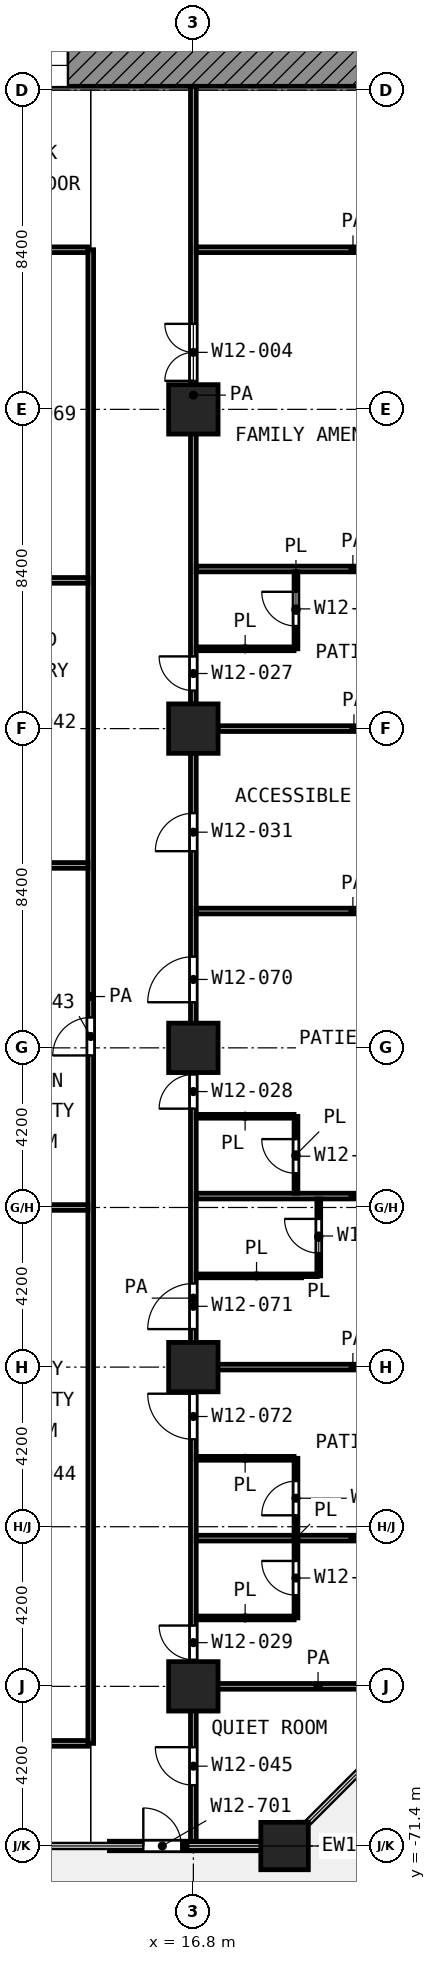
"""IFC4 building model, lengths in metres.
Left out: names, types, materials, properties, quantities, classifications, styles, units other than length and angle.
Written with IfcOpenShell. Run it as: python <this file> out.ifc"""

import sys

from ifc_helpers import new_model, si_unit, direction, frame, frame_2d, origin, origin_2d, place, context, subcontext, project, spatial, rectangle, extrude, element, fill, save


model = new_model("IFC4")
c1 = context("Model", 3, precision=1e-05, world=origin(), true_north=direction((0.0, 1.0)))
c2 = subcontext(c1, "Body", "Model", "MODEL_VIEW")
j1 = project(units=[si_unit("LENGTHUNIT", "METRE"), si_unit("PLANEANGLEUNIT", "RADIAN")], contexts=[c1])
p1 = place(None, origin())
s1 = spatial("IfcSite", under=j1, at=p1, CompositionType="ELEMENT")
p2 = place(p1, origin())
s2 = spatial("IfcBuilding", under=s1, at=p2, CompositionType="ELEMENT")
p3 = place(p2, frame((0.0, 0.0, 77.0)))
s3 = spatial("IfcBuildingStorey", under=s2, at=p3, CompositionType="ELEMENT", Elevation=77.0)
for number, where, z_axis, x_axis in (
    (1, (16.8, -33.6, 0.0), (0.0, 0.0, 1.0), (1.0, 0.0, 0.0)),
    (2, (16.8, -42.0, 0.0), (0.0, 0.0, 1.0), (1.0, 0.0, 0.0)),
    (3, (16.8, -50.4, 0.0), (0.0, 0.0, 1.0), (1.0, 0.0, 0.0)),
    (4, (16.8, -58.8, 0.0), (0.0, 0.0, 1.0), (1.0, 0.0, 0.0)),
    (5, (16.8, -67.2, 0.0), (0.0, 0.0, 1.0), (1.0, 0.0, 0.0)),
):
    element("IfcColumn", number, at=place(p3, frame(where, z_axis=z_axis, x_axis=x_axis)), inside=s3, PredefinedType="COLUMN", context=c2, shape_type="SweptSolid", body=[
        extrude(rectangle(XDim=1.3, YDim=1.3, at=origin_2d()), origin(), (0.0, 0.0, 1.0), 4.2),
    ])
p4 = place(p3, frame((19.2, -71.4, 0.0), z_axis=(0.0, 0.0, 1.0), x_axis=(1.0, 0.0, 0.0)))
e6 = element("IfcColumn", 6, at=p4, inside=s3, PredefinedType="COLUMN", context=c2, shape_type="SweptSolid", body=[
    extrude(rectangle(XDim=1.25, YDim=1.25, at=origin_2d()), origin(), (0.0, 0.0, 1.0), 4.2),
])
p5 = place(p3, frame((14.592, -71.4, 0.0), z_axis=(0.0, 0.0, 1.0), x_axis=(1.0, 0.0, 0.0)))
e7 = element("IfcWall", 7, at=p5, inside=s3, PredefinedType="SOLIDWALL", context=c2, shape_type="SweptSolid", body=[
    extrude(rectangle(XDim=3.983, YDim=0.25, at=frame_2d((1.992, 0.0))), origin(), (0.0, 0.0, 1.0), 3.78),
])
p6 = place(p5, frame((0.892, 0.0, 0.0)))
e8 = element("IfcOpeningElement", 8, at=p6, cuts=e7, PredefinedType="OPENING", context=c2, shape_type="SweptSolid", body=[
    extrude(rectangle(XDim=1.0, YDim=2.1, at=frame_2d((0.5, 1.05))), frame((0.0, 0.135, 0.0), z_axis=(0.0, -1.0, 0.0), x_axis=(1.0, 0.0, 0.0)), (0.0, 0.0, 1.0), 0.27),
])
p7 = place(p3, frame((5.4, -24.55, 0.0), z_axis=(0.0, 0.0, 1.0), x_axis=(1.0, 0.0, 0.0)))
e9 = element("IfcWall", 9, at=p7, inside=s3, PredefinedType="SHEAR", context=c2, shape_type="SweptSolid", body=[
    extrude(rectangle(XDim=18.6, YDim=1.1, at=frame_2d((9.3, 0.0))), origin(), (0.0, 0.0, 1.0), 3.9),
])
p8 = place(p7, frame((6.3, 0.0, 0.0)))
e10 = element("IfcOpeningElement", 10, at=p8, cuts=e9, PredefinedType="OPENING", context=c2, shape_type="SweptSolid", body=[
    extrude(rectangle(XDim=1.8, YDim=2.1, at=frame_2d((0.9, 1.05))), frame((0.0, 0.56, 0.0), z_axis=(0.0, -1.0, 0.0), x_axis=(1.0, 0.0, 0.0)), (0.0, 0.0, 1.0), 1.12),
])
for number, where, z_axis, x_axis in (
    (11, (16.875, -65.4, 0.0), (0.0, 0.0, 1.0), (1.0, 0.0, 0.0)),
    (12, (16.875, -61.2, 0.0), (0.0, 0.0, 1.0), (1.0, 0.0, 0.0)),
):
    element("IfcWall", number, at=place(p3, frame(where, z_axis=z_axis, x_axis=x_axis)), inside=s3, PredefinedType="PARTITIONING", context=c2, shape_type="SweptSolid", body=[
        extrude(rectangle(XDim=2.575, YDim=0.1, at=frame_2d((1.288, 0.0))), origin(), (0.0, 0.0, 1.0), 3.9),
    ])
p9 = place(p3, frame((16.875, -56.4, 0.0), z_axis=(0.0, 0.0, 1.0), x_axis=(1.0, 0.0, 0.0)))
e13 = element("IfcWall", 13, at=p9, inside=s3, PredefinedType="PARTITIONING", context=c2, shape_type="SweptSolid", body=[
    extrude(rectangle(XDim=3.175, YDim=0.1, at=frame_2d((1.587, 0.0))), origin(), (0.0, 0.0, 1.0), 3.9),
])
p10 = place(p3, frame((16.875, -52.2, 0.0), z_axis=(0.0, 0.0, 1.0), x_axis=(1.0, 0.0, 0.0)))
e14 = element("IfcWall", 14, at=p10, inside=s3, PredefinedType="PARTITIONING", context=c2, shape_type="SweptSolid", body=[
    extrude(rectangle(XDim=2.574, YDim=0.1, at=frame_2d((1.287, 0.0))), origin(), (0.0, 0.0, 1.0), 3.9),
])
p11 = place(p3, frame((16.875, -39.9, 0.0), z_axis=(0.0, 0.0, 1.0), x_axis=(1.0, 0.0, 0.0)))
e15 = element("IfcWall", 15, at=p11, inside=s3, PredefinedType="PARTITIONING", context=c2, shape_type="SweptSolid", body=[
    extrude(rectangle(XDim=2.575, YDim=0.1, at=frame_2d((1.288, 0.0))), origin(), (0.0, 0.0, 1.0), 3.9),
])
p12 = place(p3, frame((19.5, -65.4, 0.0), z_axis=(0.0, 0.0, 1.0), x_axis=(0.0, 1.0, 0.0)))
e16 = element("IfcWall", 16, at=p12, inside=s3, PredefinedType="PARTITIONING", context=c2, shape_type="SweptSolid", body=[
    extrude(rectangle(XDim=4.2, YDim=0.1, at=frame_2d((2.1, 0.0))), origin(), (0.0, 0.0, 1.0), 3.9),
])
p13 = place(p12, frame((2.7, 0.0, 0.0)))
e17 = element("IfcOpeningElement", 17, at=p13, cuts=e16, PredefinedType="OPENING", context=c2, shape_type="SweptSolid", body=[
    extrude(rectangle(XDim=0.9, YDim=2.1, at=frame_2d((0.45, 1.05))), frame((0.0, 0.06, 0.0), z_axis=(0.0, -1.0, 0.0), x_axis=(1.0, 0.0, 0.0)), (0.0, 0.0, 1.0), 0.12),
])
p14 = place(p12, frame((0.6, 0.0, 0.0)))
e18 = element("IfcOpeningElement", 18, at=p14, cuts=e16, PredefinedType="OPENING", context=c2, shape_type="SweptSolid", body=[
    extrude(rectangle(XDim=0.9, YDim=2.1, at=frame_2d((0.45, 1.05))), frame((0.0, 0.06, 0.0), z_axis=(0.0, -1.0, 0.0), x_axis=(1.0, 0.0, 0.0)), (0.0, 0.0, 1.0), 0.12),
])
p15 = place(p3, frame((19.5, -54.225, 0.0), z_axis=(0.0, 0.0, 1.0), x_axis=(0.0, 1.0, 0.0)))
e19 = element("IfcWall", 19, at=p15, inside=s3, PredefinedType="PARTITIONING", context=c2, shape_type="SweptSolid", body=[
    extrude(rectangle(XDim=2.023, YDim=0.1, at=frame_2d((1.012, 0.0))), origin(), (0.0, 0.0, 1.0), 3.9),
])
p16 = place(p15, frame((0.524, 0.0, 0.0)))
e20 = element("IfcOpeningElement", 20, at=p16, cuts=e19, PredefinedType="OPENING", context=c2, shape_type="SweptSolid", body=[
    extrude(rectangle(XDim=0.9, YDim=2.1, at=frame_2d((0.45, 1.05))), frame((0.0, 0.06, 0.0), z_axis=(0.0, -1.0, 0.0), x_axis=(1.0, 0.0, 0.0)), (0.0, 0.0, 1.0), 0.12),
])
p17 = place(p3, frame((19.5, -39.9, 0.0), z_axis=(0.0, 0.0, 1.0), x_axis=(0.0, 1.0, 0.0)))
e21 = element("IfcWall", 21, at=p17, inside=s3, PredefinedType="PARTITIONING", context=c2, shape_type="SweptSolid", body=[
    extrude(rectangle(XDim=2.025, YDim=0.1, at=frame_2d((1.012, 0.0))), origin(), (0.0, 0.0, 1.0), 3.9),
])
p18 = place(p17, frame((0.6, 0.0, 0.0)))
e22 = element("IfcOpeningElement", 22, at=p18, cuts=e21, PredefinedType="OPENING", context=c2, shape_type="SweptSolid", body=[
    extrude(rectangle(XDim=0.9, YDim=2.1, at=frame_2d((0.45, 1.05))), frame((0.0, 0.06, 0.0), z_axis=(0.0, -1.0, 0.0), x_axis=(1.0, 0.0, 0.0)), (0.0, 0.0, 1.0), 0.12),
])
p19 = place(p3, frame((20.1, -56.4, 0.0), z_axis=(0.0, 0.0, 1.0), x_axis=(0.0, 1.0, 0.0)))
e23 = element("IfcWall", 23, at=p19, inside=s3, PredefinedType="PARTITIONING", context=c2, shape_type="SweptSolid", body=[
    extrude(rectangle(XDim=2.025, YDim=0.1, at=frame_2d((1.012, 0.0))), origin(), (0.0, 0.0, 1.0), 3.9),
])
p20 = place(p19, frame((0.6, 0.0, 0.0)))
e24 = element("IfcOpeningElement", 24, at=p20, cuts=e23, PredefinedType="OPENING", context=c2, shape_type="SweptSolid", body=[
    extrude(rectangle(XDim=0.9, YDim=2.1, at=frame_2d((0.45, 1.05))), frame((0.0, 0.06, 0.0), z_axis=(0.0, -1.0, 0.0), x_axis=(1.0, 0.0, 0.0)), (0.0, 0.0, 1.0), 0.12),
])
p21 = place(p3, frame((11.175, -68.7, 0.0), z_axis=(0.0, 0.0, 1.0), x_axis=(1.0, 0.0, 0.0)))
e25 = element("IfcWall", 25, at=p21, inside=s3, PredefinedType="PARTITIONING", context=c2, shape_type="SweptSolid", body=[
    extrude(rectangle(XDim=2.85, YDim=0.15, at=frame_2d((1.425, 0.0))), origin(), (0.0, 0.0, 1.0), 3.9),
])
p22 = place(p3, frame((16.875, -67.2, 0.0), z_axis=(0.0, 0.0, 1.0), x_axis=(1.0, 0.0, 0.0)))
e26 = element("IfcWall", 26, at=p22, inside=s3, PredefinedType="PARTITIONING", context=c2, shape_type="SweptSolid", body=[
    extrude(rectangle(XDim=6.412, YDim=0.15, at=frame_2d((3.206, 0.0))), origin(), (0.0, 0.0, 1.0), 3.9),
])
for number, where, z_axis, x_axis in (
    (27, (16.875, -63.3, 0.0), (0.0, 0.0, 1.0), (1.0, 0.0, 0.0)),
    (28, (16.875, -58.8, 0.0), (0.0, 0.0, 1.0), (1.0, 0.0, 0.0)),
):
    element("IfcWall", number, at=place(p3, frame(where, z_axis=z_axis, x_axis=x_axis)), inside=s3, PredefinedType="PARTITIONING", context=c2, shape_type="SweptSolid", body=[
        extrude(rectangle(XDim=8.245, YDim=0.15, at=frame_2d((4.123, 0.0))), origin(), (0.0, 0.0, 1.0), 3.9),
    ])
p23 = place(p3, frame((11.175, -54.6, 0.0), z_axis=(0.0, 0.0, 1.0), x_axis=(1.0, 0.0, 0.0)))
e29 = element("IfcWall", 29, at=p23, inside=s3, PredefinedType="PARTITIONING", context=c2, shape_type="SweptSolid", body=[
    extrude(rectangle(XDim=2.85, YDim=0.15, at=frame_2d((1.425, 0.0))), origin(), (0.0, 0.0, 1.0), 3.9),
])
for number, where, z_axis, x_axis in (
    (30, (16.875, -54.3, 0.0), (0.0, 0.0, 1.0), (1.0, 0.0, 0.0)),
    (31, (16.875, -46.8, 0.0), (0.0, 0.0, 1.0), (1.0, 0.0, 0.0)),
):
    element("IfcWall", number, at=place(p3, frame(where, z_axis=z_axis, x_axis=x_axis)), inside=s3, PredefinedType="PARTITIONING", context=c2, shape_type="SweptSolid", body=[
        extrude(rectangle(XDim=8.245, YDim=0.15, at=frame_2d((4.123, 0.0))), origin(), (0.0, 0.0, 1.0), 3.9),
    ])
p24 = place(p3, frame((11.175, -45.6, 0.0), z_axis=(0.0, 0.0, 1.0), x_axis=(1.0, 0.0, 0.0)))
e32 = element("IfcWall", 32, at=p24, inside=s3, PredefinedType="PARTITIONING", context=c2, shape_type="SweptSolid", body=[
    extrude(rectangle(XDim=2.85, YDim=0.15, at=frame_2d((1.425, 0.0))), origin(), (0.0, 0.0, 1.0), 3.9),
])
p25 = place(p3, frame((17.45, -42.0, 0.0), z_axis=(0.0, 0.0, 1.0), x_axis=(1.0, 0.0, 0.0)))
e33 = element("IfcWall", 33, at=p25, inside=s3, PredefinedType="PARTITIONING", context=c2, shape_type="SweptSolid", body=[
    extrude(rectangle(XDim=7.15, YDim=0.15, at=frame_2d((3.575, 0.0))), origin(), (0.0, 0.0, 1.0), 3.9),
])
p26 = place(p3, frame((11.175, -38.1, 0.0), z_axis=(0.0, 0.0, 1.0), x_axis=(1.0, 0.0, 0.0)))
e34 = element("IfcWall", 34, at=p26, inside=s3, PredefinedType="PARTITIONING", context=c2, shape_type="SweptSolid", body=[
    extrude(rectangle(XDim=2.85, YDim=0.15, at=frame_2d((1.425, 0.0))), origin(), (0.0, 0.0, 1.0), 3.9),
])
p27 = place(p3, frame((16.875, -37.8, 0.0), z_axis=(0.0, 0.0, 1.0), x_axis=(1.0, 0.0, 0.0)))
e35 = element("IfcWall", 35, at=p27, inside=s3, PredefinedType="PARTITIONING", context=c2, shape_type="SweptSolid", body=[
    extrude(rectangle(XDim=8.245, YDim=0.15, at=frame_2d((4.123, 0.0))), origin(), (0.0, 0.0, 1.0), 3.9),
])
p28 = place(p3, frame((11.175, -29.4, 0.0), z_axis=(0.0, 0.0, 1.0), x_axis=(1.0, 0.0, 0.0)))
e36 = element("IfcWall", 36, at=p28, inside=s3, PredefinedType="PARTITIONING", context=c2, shape_type="SweptSolid", body=[
    extrude(rectangle(XDim=2.85, YDim=0.15, at=frame_2d((1.425, 0.0))), origin(), (0.0, 0.0, 1.0), 3.9),
])
p29 = place(p3, frame((16.875, -29.4, 0.0), z_axis=(0.0, 0.0, 1.0), x_axis=(1.0, 0.0, 0.0)))
e37 = element("IfcWall", 37, at=p29, inside=s3, PredefinedType="PARTITIONING", context=c2, shape_type="SweptSolid", body=[
    extrude(rectangle(XDim=8.25, YDim=0.15, at=frame_2d((4.125, 0.0))), origin(), (0.0, 0.0, 1.0), 3.9),
])
p30 = place(p3, frame((14.1, -68.7, 0.0), z_axis=(0.0, 0.0, 1.0), x_axis=(0.0, 1.0, 0.0)))
e38 = element("IfcWall", 38, at=p30, inside=s3, PredefinedType="PARTITIONING", context=c2, shape_type="SweptSolid", body=[
    extrude(rectangle(XDim=39.3, YDim=0.15, at=frame_2d((19.65, 0.0))), origin(), (0.0, 0.0, 1.0), 3.9),
])
p31 = place(p30, frame((18.1, 0.0, 0.0)))
e39 = element("IfcOpeningElement", 39, at=p31, cuts=e38, PredefinedType="OPENING", context=c2, shape_type="SweptSolid", body=[
    extrude(rectangle(XDim=1.0, YDim=2.1, at=frame_2d((0.5, 1.05))), frame((0.0, 0.085, 0.0), z_axis=(0.0, -1.0, 0.0), x_axis=(1.0, 0.0, 0.0)), (0.0, 0.0, 1.0), 0.17),
])
p32 = place(p3, frame((16.8, -71.32, 0.0), z_axis=(0.0, 0.0, 1.0), x_axis=(0.0, 1.0, 0.0)))
e40 = element("IfcWall", 40, at=p32, inside=s3, PredefinedType="PARTITIONING", context=c2, shape_type="SweptSolid", body=[
    extrude(rectangle(XDim=28.67, YDim=0.15, at=frame_2d((14.335, 0.0))), origin(), (0.0, 0.0, 1.0), 3.9),
])
p33 = place(p32, frame((26.095, 0.0, 0.0)))
e41 = element("IfcOpeningElement", 41, at=p33, cuts=e40, PredefinedType="OPENING", context=c2, shape_type="SweptSolid", body=[
    extrude(rectangle(XDim=1.0, YDim=2.1, at=frame_2d((0.5, 1.05))), frame((0.0, 0.085, 0.0), z_axis=(0.0, -1.0, 0.0), x_axis=(1.0, 0.0, 0.0)), (0.0, 0.0, 1.0), 0.17),
])
p34 = place(p32, frame((22.12, 0.0, 0.0)))
e42 = element("IfcOpeningElement", 42, at=p34, cuts=e40, PredefinedType="OPENING", context=c2, shape_type="SweptSolid", body=[
    extrude(rectangle(XDim=1.2, YDim=2.1, at=frame_2d((0.6, 1.05))), frame((0.0, 0.085, 0.0), z_axis=(0.0, -1.0, 0.0), x_axis=(1.0, 0.0, 0.0)), (0.0, 0.0, 1.0), 0.17),
])
p35 = place(p32, frame((19.32, 0.0, 0.0)))
e43 = element("IfcOpeningElement", 43, at=p35, cuts=e40, PredefinedType="OPENING", context=c2, shape_type="SweptSolid", body=[
    extrude(rectangle(XDim=0.9, YDim=2.1, at=frame_2d((0.45, 1.05))), frame((0.0, 0.085, 0.0), z_axis=(0.0, -1.0, 0.0), x_axis=(1.0, 0.0, 0.0)), (0.0, 0.0, 1.0), 0.17),
])
p36 = place(p32, frame((13.52, 0.0, 0.0)))
e44 = element("IfcOpeningElement", 44, at=p36, cuts=e40, PredefinedType="OPENING", context=c2, shape_type="SweptSolid", body=[
    extrude(rectangle(XDim=1.2, YDim=2.1, at=frame_2d((0.6, 1.05))), frame((0.0, 0.085, 0.0), z_axis=(0.0, -1.0, 0.0), x_axis=(1.0, 0.0, 0.0)), (0.0, 0.0, 1.0), 0.17),
])
p37 = place(p32, frame((10.62, 0.0, 0.0)))
e45 = element("IfcOpeningElement", 45, at=p37, cuts=e40, PredefinedType="OPENING", context=c2, shape_type="SweptSolid", body=[
    extrude(rectangle(XDim=1.2, YDim=2.1, at=frame_2d((0.6, 1.05))), frame((0.0, 0.085, 0.0), z_axis=(0.0, -1.0, 0.0), x_axis=(1.0, 0.0, 0.0)), (0.0, 0.0, 1.0), 0.17),
])
p38 = place(p32, frame((4.82, 0.0, 0.0)))
e46 = element("IfcOpeningElement", 46, at=p38, cuts=e40, PredefinedType="OPENING", context=c2, shape_type="SweptSolid", body=[
    extrude(rectangle(XDim=0.9, YDim=2.1, at=frame_2d((0.45, 1.05))), frame((0.0, 0.085, 0.0), z_axis=(0.0, -1.0, 0.0), x_axis=(1.0, 0.0, 0.0)), (0.0, 0.0, 1.0), 0.17),
])
p39 = place(p32, frame((1.52, 0.0, 0.0)))
e47 = element("IfcOpeningElement", 47, at=p39, cuts=e40, PredefinedType="OPENING", context=c2, shape_type="SweptSolid", body=[
    extrude(rectangle(XDim=1.0, YDim=2.1, at=frame_2d((0.5, 1.05))), frame((0.0, 0.085, 0.0), z_axis=(0.0, -1.0, 0.0), x_axis=(1.0, 0.0, 0.0)), (0.0, 0.0, 1.0), 0.17),
])
p40 = place(p3, frame((16.8, -41.35, 0.0), z_axis=(0.0, 0.0, 1.0), x_axis=(0.0, 1.0, 0.0)))
e48 = element("IfcWall", 48, at=p40, inside=s3, PredefinedType="PARTITIONING", context=c2, shape_type="SweptSolid", body=[
    extrude(rectangle(XDim=16.25, YDim=0.15, at=frame_2d((8.125, 0.0))), origin(), (0.0, 0.0, 1.0), 3.9),
])
p41 = place(p40, frame((8.5, 0.0, 0.0)))
e49 = element("IfcOpeningElement", 49, at=p41, cuts=e48, PredefinedType="OPENING", context=c2, shape_type="SweptSolid", body=[
    extrude(rectangle(XDim=1.5, YDim=2.1, at=frame_2d((0.75, 1.05))), frame((0.0, 0.085, 0.0), z_axis=(0.0, -1.0, 0.0), x_axis=(1.0, 0.0, 0.0)), (0.0, 0.0, 1.0), 0.17),
])
p42 = place(p40, frame((0.35, 0.0, 0.0)))
e50 = element("IfcOpeningElement", 50, at=p42, cuts=e48, PredefinedType="OPENING", context=c2, shape_type="SweptSolid", body=[
    extrude(rectangle(XDim=0.9, YDim=2.1, at=frame_2d((0.45, 1.05))), frame((0.0, 0.085, 0.0), z_axis=(0.0, -1.0, 0.0), x_axis=(1.0, 0.0, 0.0)), (0.0, 0.0, 1.0), 0.17),
])
p43 = place(p6, origin())
e51 = element("IfcDoor", 51, at=p43, inside=s3, OperationType="SINGLE_SWING_LEFT", PredefinedType="DOOR", context=c2, shape_type="SweptSolid", body=[
    extrude(rectangle(XDim=1.0, YDim=2.1, at=frame_2d((0.5, 1.05))), frame((0.0, 0.025, 0.0), z_axis=(0.0, -1.0, 0.0), x_axis=(1.0, 0.0, 0.0)), (0.0, 0.0, 1.0), 0.05),
])
fill(e8, e51)
p44 = place(p8, origin())
e52 = element("IfcDoor", 52, at=p44, inside=s3, OperationType="DOUBLE_DOOR_SINGLE_SWING", PredefinedType="DOOR", context=c2, shape_type="SweptSolid", body=[
    extrude(rectangle(XDim=1.8, YDim=2.1, at=frame_2d((0.9, 1.05))), frame((0.0, 0.025, 0.0), z_axis=(0.0, -1.0, 0.0), x_axis=(1.0, 0.0, 0.0)), (0.0, 0.0, 1.0), 0.05),
])
fill(e10, e52)
p45 = place(p31, origin())
e53 = element("IfcDoor", 53, at=p45, inside=s3, OperationType="SINGLE_SWING_LEFT", PredefinedType="DOOR", context=c2, shape_type="SweptSolid", body=[
    extrude(rectangle(XDim=1.0, YDim=2.1, at=frame_2d((0.5, 1.05))), frame((0.0, 0.025, 0.0), z_axis=(0.0, -1.0, 0.0), x_axis=(1.0, 0.0, 0.0)), (0.0, 0.0, 1.0), 0.05),
])
fill(e39, e53)
p46 = place(p41, origin())
e54 = element("IfcDoor", 54, at=p46, inside=s3, OperationType="DOUBLE_DOOR_SINGLE_SWING", PredefinedType="DOOR", context=c2, shape_type="SweptSolid", body=[
    extrude(rectangle(XDim=1.5, YDim=2.1, at=frame_2d((0.75, 1.05))), frame((0.0, 0.025, 0.0), z_axis=(0.0, -1.0, 0.0), x_axis=(1.0, 0.0, 0.0)), (0.0, 0.0, 1.0), 0.05),
])
fill(e49, e54)
p47 = place(p42, origin())
e55 = element("IfcDoor", 55, at=p47, inside=s3, OperationType="SINGLE_SWING_RIGHT", PredefinedType="DOOR", context=c2, shape_type="SweptSolid", body=[
    extrude(rectangle(XDim=0.9, YDim=2.1, at=frame_2d((0.45, 1.05))), frame((0.0, 0.025, 0.0), z_axis=(0.0, -1.0, 0.0), x_axis=(1.0, 0.0, 0.0)), (0.0, 0.0, 1.0), 0.05),
])
fill(e50, e55)
p48 = place(p18, origin())
e56 = element("IfcDoor", 56, at=p48, inside=s3, OperationType="SINGLE_SWING_RIGHT", PredefinedType="DOOR", context=c2, shape_type="SweptSolid", body=[
    extrude(rectangle(XDim=0.9, YDim=2.1, at=frame_2d((0.45, 1.05))), frame((0.0, 0.025, 0.0), z_axis=(0.0, -1.0, 0.0), x_axis=(1.0, 0.0, 0.0)), (0.0, 0.0, 1.0), 0.05),
])
fill(e22, e56)
p49 = place(p33, origin())
e57 = element("IfcDoor", 57, at=p49, inside=s3, OperationType="SINGLE_SWING_LEFT", PredefinedType="DOOR", context=c2, shape_type="SweptSolid", body=[
    extrude(rectangle(XDim=1.0, YDim=2.1, at=frame_2d((0.5, 1.05))), frame((0.0, 0.025, 0.0), z_axis=(0.0, -1.0, 0.0), x_axis=(1.0, 0.0, 0.0)), (0.0, 0.0, 1.0), 0.05),
])
fill(e41, e57)
p50 = place(p34, origin())
e58 = element("IfcDoor", 58, at=p50, inside=s3, OperationType="SINGLE_SWING_LEFT", PredefinedType="DOOR", context=c2, shape_type="SweptSolid", body=[
    extrude(rectangle(XDim=1.2, YDim=2.1, at=frame_2d((0.6, 1.05))), frame((0.0, 0.025, 0.0), z_axis=(0.0, -1.0, 0.0), x_axis=(1.0, 0.0, 0.0)), (0.0, 0.0, 1.0), 0.05),
])
fill(e42, e58)
p51 = place(p35, origin())
e59 = element("IfcDoor", 59, at=p51, inside=s3, OperationType="SINGLE_SWING_LEFT", PredefinedType="DOOR", context=c2, shape_type="SweptSolid", body=[
    extrude(rectangle(XDim=0.9, YDim=2.1, at=frame_2d((0.45, 1.05))), frame((0.0, 0.025, 0.0), z_axis=(0.0, -1.0, 0.0), x_axis=(1.0, 0.0, 0.0)), (0.0, 0.0, 1.0), 0.05),
])
fill(e43, e59)
p52 = place(p16, origin())
e60 = element("IfcDoor", 60, at=p52, inside=s3, OperationType="SINGLE_SWING_RIGHT", PredefinedType="DOOR", context=c2, shape_type="SweptSolid", body=[
    extrude(rectangle(XDim=0.9, YDim=2.1, at=frame_2d((0.45, 1.05))), frame((0.0, 0.025, 0.0), z_axis=(0.0, -1.0, 0.0), x_axis=(1.0, 0.0, 0.0)), (0.0, 0.0, 1.0), 0.05),
])
fill(e20, e60)
p53 = place(p36, origin())
e61 = element("IfcDoor", 61, at=p53, inside=s3, OperationType="SINGLE_SWING_LEFT", PredefinedType="DOOR", context=c2, shape_type="SweptSolid", body=[
    extrude(rectangle(XDim=1.2, YDim=2.1, at=frame_2d((0.6, 1.05))), frame((0.0, 0.025, 0.0), z_axis=(0.0, -1.0, 0.0), x_axis=(1.0, 0.0, 0.0)), (0.0, 0.0, 1.0), 0.05),
])
fill(e44, e61)
p54 = place(p20, origin())
e62 = element("IfcDoor", 62, at=p54, inside=s3, OperationType="SINGLE_SWING_RIGHT", PredefinedType="DOOR", context=c2, shape_type="SweptSolid", body=[
    extrude(rectangle(XDim=0.9, YDim=2.1, at=frame_2d((0.45, 1.05))), frame((0.0, 0.025, 0.0), z_axis=(0.0, -1.0, 0.0), x_axis=(1.0, 0.0, 0.0)), (0.0, 0.0, 1.0), 0.05),
])
fill(e24, e62)
p55 = place(p37, origin())
e63 = element("IfcDoor", 63, at=p55, inside=s3, OperationType="SINGLE_SWING_RIGHT", PredefinedType="DOOR", context=c2, shape_type="SweptSolid", body=[
    extrude(rectangle(XDim=1.2, YDim=2.1, at=frame_2d((0.6, 1.05))), frame((0.0, 0.025, 0.0), z_axis=(0.0, -1.0, 0.0), x_axis=(1.0, 0.0, 0.0)), (0.0, 0.0, 1.0), 0.05),
])
fill(e45, e63)
p56 = place(p13, origin())
e64 = element("IfcDoor", 64, at=p56, inside=s3, OperationType="SINGLE_SWING_LEFT", PredefinedType="DOOR", context=c2, shape_type="SweptSolid", body=[
    extrude(rectangle(XDim=0.9, YDim=2.1, at=frame_2d((0.45, 1.05))), frame((0.0, 0.025, 0.0), z_axis=(0.0, -1.0, 0.0), x_axis=(1.0, 0.0, 0.0)), (0.0, 0.0, 1.0), 0.05),
])
fill(e17, e64)
p57 = place(p38, origin())
e65 = element("IfcDoor", 65, at=p57, inside=s3, OperationType="SINGLE_SWING_RIGHT", PredefinedType="DOOR", context=c2, shape_type="SweptSolid", body=[
    extrude(rectangle(XDim=0.9, YDim=2.1, at=frame_2d((0.45, 1.05))), frame((0.0, 0.025, 0.0), z_axis=(0.0, -1.0, 0.0), x_axis=(1.0, 0.0, 0.0)), (0.0, 0.0, 1.0), 0.05),
])
fill(e46, e65)
p58 = place(p14, origin())
e66 = element("IfcDoor", 66, at=p58, inside=s3, OperationType="SINGLE_SWING_RIGHT", PredefinedType="DOOR", context=c2, shape_type="SweptSolid", body=[
    extrude(rectangle(XDim=0.9, YDim=2.1, at=frame_2d((0.45, 1.05))), frame((0.0, 0.025, 0.0), z_axis=(0.0, -1.0, 0.0), x_axis=(1.0, 0.0, 0.0)), (0.0, 0.0, 1.0), 0.05),
])
fill(e18, e66)
p59 = place(p39, origin())
e67 = element("IfcDoor", 67, at=p59, inside=s3, OperationType="SINGLE_SWING_RIGHT", PredefinedType="DOOR", context=c2, shape_type="SweptSolid", body=[
    extrude(rectangle(XDim=1.0, YDim=2.1, at=frame_2d((0.5, 1.05))), frame((0.0, 0.025, 0.0), z_axis=(0.0, -1.0, 0.0), x_axis=(1.0, 0.0, 0.0)), (0.0, 0.0, 1.0), 0.05),
])
fill(e47, e67)
save(model, sys.argv[1])
